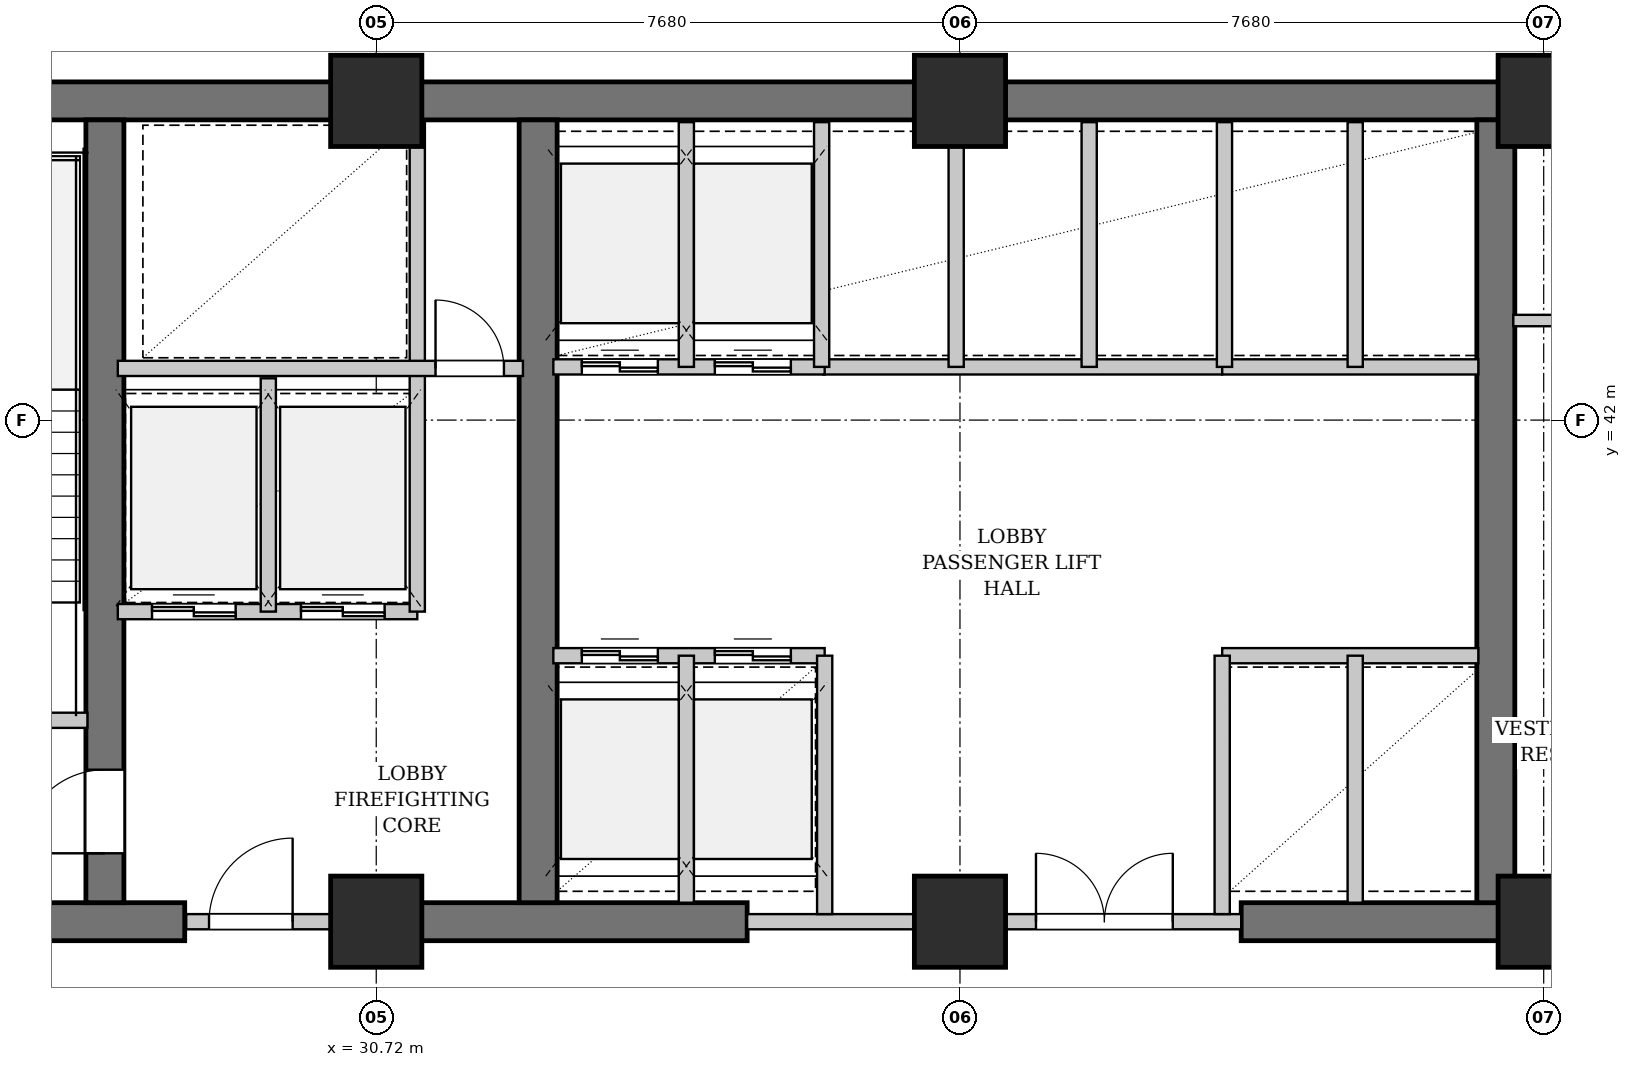
"""IFC4 building model, lengths in metres.
Left out: names, types, materials, properties, quantities, classifications, styles, units other than length and angle.
Written with IfcOpenShell. Run it as: python <this file> out.ifc"""

import sys

from ifc_helpers import new_model, si_unit, direction, frame, frame_2d, origin, origin_2d, place, context, subcontext, project, spatial, rectangle, extrude, element, fill, save


model = new_model("IFC4")
c1 = context("Model", 3, precision=1e-05, world=origin(), true_north=direction((0.0, 1.0)))
c2 = subcontext(c1, "Body", "Model", "MODEL_VIEW")
j1 = project(units=[si_unit("LENGTHUNIT", "METRE"), si_unit("PLANEANGLEUNIT", "RADIAN")], contexts=[c1])
p1 = place(None, origin())
s1 = spatial("IfcSite", under=j1, at=p1, CompositionType="ELEMENT")
p2 = place(p1, origin())
s2 = spatial("IfcBuilding", under=s1, at=p2, CompositionType="ELEMENT")
p3 = place(p2, frame((0.0, 0.0, 81.9)))
s3 = spatial("IfcBuildingStorey", under=s2, at=p3, CompositionType="ELEMENT", Elevation=81.9)
p4 = place(p3, frame((22.79, 46.2, 0.0), z_axis=(0.0, 0.0, 1.0), x_axis=(1.0, 0.0, 0.0)))
e1 = element("IfcWall", 1, at=p4, inside=s3, PredefinedType="SHEAR", context=c2, shape_type="SweptSolid", body=[
    extrude(rectangle(XDim=31.22, YDim=0.5, at=frame_2d((15.61, 0.0))), origin(), (0.0, 0.0, 1.0), 3.48),
])
p5 = place(p3, frame((22.79, 35.4, 0.0), z_axis=(0.0, 0.0, 1.0), x_axis=(1.0, 0.0, 0.0)))
e2 = element("IfcWall", 2, at=p5, inside=s3, PredefinedType="SHEAR", context=c2, shape_type="SweptSolid", body=[
    extrude(rectangle(XDim=5.41, YDim=0.5, at=frame_2d((2.705, 0.0))), origin(), (0.0, 0.0, 1.0), 3.48),
])
p6 = place(p3, frame((30.72, 35.4, 0.0), z_axis=(0.0, 0.0, 1.0), x_axis=(1.0, 0.0, 0.0)))
e3 = element("IfcWall", 3, at=p6, inside=s3, PredefinedType="SHEAR", context=c2, shape_type="SweptSolid", body=[
    extrude(rectangle(XDim=4.88, YDim=0.5, at=frame_2d((2.44, 0.0))), origin(), (0.0, 0.0, 1.0), 3.48),
])
p7 = place(p3, frame((42.1, 35.4, 0.0), z_axis=(0.0, 0.0, 1.0), x_axis=(1.0, 0.0, 0.0)))
e4 = element("IfcWall", 4, at=p7, inside=s3, PredefinedType="SHEAR", context=c2, shape_type="SweptSolid", body=[
    extrude(rectangle(XDim=8.05, YDim=0.5, at=frame_2d((4.025, 0.0))), origin(), (0.0, 0.0, 1.0), 3.48),
])
p8 = place(p7, frame((4.85, 0.0, 0.0)))
e5 = element("IfcOpeningElement", 5, at=p8, cuts=e4, PredefinedType="OPENING", context=c2, shape_type="SweptSolid", body=[
    extrude(rectangle(XDim=0.9, YDim=2.15, at=frame_2d((0.45, 1.075))), frame((0.0, 0.26, 0.0), z_axis=(0.0, -1.0, 0.0), x_axis=(1.0, 0.0, 0.0)), (0.0, 0.0, 1.0), 0.52),
])
p9 = place(p3, frame((27.15, 35.65, 0.0), z_axis=(0.0, 0.0, 1.0), x_axis=(0.0, 1.0, 0.0)))
e6 = element("IfcWall", 6, at=p9, inside=s3, PredefinedType="SHEAR", context=c2, shape_type="SweptSolid", body=[
    extrude(rectangle(XDim=10.3, YDim=0.5, at=frame_2d((5.15, 0.0))), origin(), (0.0, 0.0, 1.0), 3.48),
])
p10 = place(p9, frame((0.65, 0.0, 0.0)))
e7 = element("IfcOpeningElement", 7, at=p10, cuts=e6, PredefinedType="OPENING", context=c2, shape_type="SweptSolid", body=[
    extrude(rectangle(XDim=1.1, YDim=2.15, at=frame_2d((0.55, 1.075))), frame((0.0, 0.26, 0.0), z_axis=(0.0, -1.0, 0.0), x_axis=(1.0, 0.0, 0.0)), (0.0, 0.0, 1.0), 0.52),
])
for number, where, z_axis, x_axis in (
    (8, (32.85, 35.65, 0.0), (0.0, 0.0, 1.0), (0.0, 1.0, 0.0)),
    (9, (45.45, 35.65, 0.0), (0.0, 0.0, 1.0), (0.0, 1.0, 0.0)),
):
    element("IfcWall", number, at=place(p3, frame(where, z_axis=z_axis, x_axis=x_axis)), inside=s3, PredefinedType="SHEAR", context=c2, shape_type="SweptSolid", body=[
        extrude(rectangle(XDim=10.3, YDim=0.5, at=frame_2d((5.15, 0.0))), origin(), (0.0, 0.0, 1.0), 3.48),
    ])
for number, where, z_axis, x_axis in (
    (10, (30.72, 35.4, 0.0), (0.0, 0.0, 1.0), (1.0, 0.0, 0.0)),
    (11, (30.72, 46.2, 0.0), (0.0, 0.0, 1.0), (1.0, 0.0, 0.0)),
    (12, (38.4, 35.4, 0.0), (0.0, 0.0, 1.0), (1.0, 0.0, 0.0)),
    (13, (38.4, 46.2, 0.0), (0.0, 0.0, 1.0), (1.0, 0.0, 0.0)),
    (14, (46.08, 35.4, 0.0), (0.0, 0.0, 1.0), (1.0, 0.0, 0.0)),
    (15, (46.08, 46.2, 0.0), (0.0, 0.0, 1.0), (1.0, 0.0, 0.0)),
):
    element("IfcColumn", number, at=place(p3, frame(where, z_axis=z_axis, x_axis=x_axis)), inside=s3, PredefinedType="COLUMN", context=c2, shape_type="SweptSolid", body=[
        extrude(rectangle(XDim=1.2, YDim=1.2, at=origin_2d()), origin(), (0.0, 0.0, 1.0), 3.9),
    ])
p11 = place(p3, frame((23.3, 38.05, 0.0), z_axis=(0.0, 0.0, 1.0), x_axis=(1.0, 0.0, 0.0)))
e16 = element("IfcWall", 16, at=p11, inside=s3, PredefinedType="PARTITIONING", context=c2, shape_type="SweptSolid", body=[
    extrude(rectangle(XDim=3.62, YDim=0.2, at=frame_2d((1.81, 0.0))), origin(), (0.0, 0.0, 1.0), 3.48),
])
p12 = place(p11, frame((1.26, 0.0, 0.0)))
e17 = element("IfcOpeningElement", 17, at=p12, cuts=e16, PredefinedType="OPENING", context=c2, shape_type="SweptSolid", body=[
    extrude(rectangle(XDim=1.1, YDim=2.15, at=frame_2d((0.55, 1.075))), frame((0.0, 0.11, 0.0), z_axis=(0.0, -1.0, 0.0), x_axis=(1.0, 0.0, 0.0)), (0.0, 0.0, 1.0), 0.22),
])
p13 = place(p3, frame((28.22, 35.4, 0.0), z_axis=(0.0, 0.0, 1.0), x_axis=(1.0, 0.0, 0.0)))
e18 = element("IfcWall", 18, at=p13, inside=s3, PredefinedType="PARTITIONING", context=c2, shape_type="SweptSolid", body=[
    extrude(rectangle(XDim=2.5, YDim=0.2, at=frame_2d((1.25, 0.0))), origin(), (0.0, 0.0, 1.0), 2.565),
])
p14 = place(p13, frame((0.3, 0.0, 0.0)))
e19 = element("IfcOpeningElement", 19, at=p14, cuts=e18, PredefinedType="OPENING", context=c2, shape_type="SweptSolid", body=[
    extrude(rectangle(XDim=1.1, YDim=2.15, at=frame_2d((0.55, 1.075))), frame((0.0, 0.11, 0.0), z_axis=(0.0, -1.0, 0.0), x_axis=(1.0, 0.0, 0.0)), (0.0, 0.0, 1.0), 0.22),
])
p15 = place(p3, frame((27.32, 39.48, 0.0), z_axis=(0.0, 0.0, 1.0), x_axis=(1.0, 0.0, 0.0)))
e20 = element("IfcWall", 20, at=p15, inside=s3, PredefinedType="PARTITIONING", context=c2, shape_type="SweptSolid", body=[
    extrude(rectangle(XDim=3.94, YDim=0.2, at=frame_2d((1.97, 0.0))), origin(), (0.0, 0.0, 1.0), 3.48),
])
p16 = place(p15, frame((0.45, 0.0, 0.0)))
e21 = element("IfcOpeningElement", 21, at=p16, cuts=e20, PredefinedType="OPENING", context=c2, shape_type="SweptSolid", body=[
    extrude(rectangle(XDim=1.1, YDim=2.2, at=frame_2d((0.55, 1.1))), frame((0.0, 0.11, 0.0), z_axis=(0.0, -1.0, 0.0), x_axis=(1.0, 0.0, 0.0)), (0.0, 0.0, 1.0), 0.22),
])
p17 = place(p15, frame((2.41, 0.0, 0.0)))
e22 = element("IfcOpeningElement", 22, at=p17, cuts=e20, PredefinedType="OPENING", context=c2, shape_type="SweptSolid", body=[
    extrude(rectangle(XDim=1.1, YDim=2.2, at=frame_2d((0.55, 1.1))), frame((0.0, 0.11, 0.0), z_axis=(0.0, -1.0, 0.0), x_axis=(1.0, 0.0, 0.0)), (0.0, 0.0, 1.0), 0.22),
])
p18 = place(p3, frame((29.3, 39.48, 0.0), z_axis=(0.0, 0.0, 1.0), x_axis=(0.0, 1.0, 0.0)))
e23 = element("IfcWall", 23, at=p18, inside=s3, PredefinedType="PARTITIONING", context=c2, shape_type="SweptSolid", body=[
    extrude(rectangle(XDim=3.07, YDim=0.2, at=frame_2d((1.535, 0.0))), origin(), (0.0, 0.0, 1.0), 3.48),
])
p19 = place(p3, frame((31.26, 39.48, 0.0), z_axis=(0.0, 0.0, 1.0), x_axis=(0.0, 1.0, 0.0)))
e24 = element("IfcWall", 24, at=p19, inside=s3, PredefinedType="PARTITIONING", context=c2, shape_type="SweptSolid", body=[
    extrude(rectangle(XDim=6.44, YDim=0.2, at=frame_2d((3.22, 0.0))), origin(), (0.0, 0.0, 1.0), 3.48),
])
p20 = place(p3, frame((27.32, 42.68, 0.0), z_axis=(0.0, 0.0, 1.0), x_axis=(1.0, 0.0, 0.0)))
e25 = element("IfcWall", 25, at=p20, inside=s3, PredefinedType="PARTITIONING", context=c2, shape_type="SweptSolid", body=[
    extrude(rectangle(XDim=5.33, YDim=0.2, at=frame_2d((2.665, 0.0))), origin(), (0.0, 0.0, 1.0), 3.48),
])
p21 = place(p20, frame((4.18, 0.0, 0.0)))
e26 = element("IfcOpeningElement", 26, at=p21, cuts=e25, PredefinedType="OPENING", context=c2, shape_type="SweptSolid", body=[
    extrude(rectangle(XDim=0.9, YDim=2.15, at=frame_2d((0.45, 1.075))), frame((0.0, 0.11, 0.0), z_axis=(0.0, -1.0, 0.0), x_axis=(1.0, 0.0, 0.0)), (0.0, 0.0, 1.0), 0.22),
])
p22 = place(p3, frame((35.6, 35.4, 0.0), z_axis=(0.0, 0.0, 1.0), x_axis=(1.0, 0.0, 0.0)))
e27 = element("IfcWall", 27, at=p22, inside=s3, PredefinedType="PARTITIONING", context=c2, shape_type="SweptSolid", body=[
    extrude(rectangle(XDim=6.5, YDim=0.2, at=frame_2d((3.25, 0.0))), origin(), (0.0, 0.0, 1.0), 2.565),
])
p23 = place(p22, frame((3.8, 0.0, 0.0)))
e28 = element("IfcOpeningElement", 28, at=p23, cuts=e27, PredefinedType="OPENING", context=c2, shape_type="SweptSolid", body=[
    extrude(rectangle(XDim=1.8, YDim=2.3, at=frame_2d((0.9, 1.15))), frame((0.0, 0.11, 0.0), z_axis=(0.0, -1.0, 0.0), x_axis=(1.0, 0.0, 0.0)), (0.0, 0.0, 1.0), 0.22),
])
p24 = place(p3, frame((36.6, 42.7, 0.0), z_axis=(0.0, 0.0, 1.0), x_axis=(1.0, 0.0, 0.0)))
e29 = element("IfcWall", 29, at=p24, inside=s3, PredefinedType="PARTITIONING", context=c2, shape_type="SweptSolid", body=[
    extrude(rectangle(XDim=5.25, YDim=0.2, at=frame_2d((2.625, 0.0))), origin(), (0.0, 0.0, 1.0), 3.48),
])
p25 = place(p3, frame((38.35, 42.7, 0.0), z_axis=(0.0, 0.0, 1.0), x_axis=(0.0, 1.0, 0.0)))
e30 = element("IfcWall", 30, at=p25, inside=s3, PredefinedType="PARTITIONING", context=c2, shape_type="SweptSolid", body=[
    extrude(rectangle(XDim=3.22, YDim=0.2, at=frame_2d((1.61, 0.0))), origin(), (0.0, 0.0, 1.0), 2.565),
])
p26 = place(p3, frame((40.1, 42.7, 0.0), z_axis=(0.0, 0.0, 1.0), x_axis=(0.0, 1.0, 0.0)))
e31 = element("IfcWall", 31, at=p26, inside=s3, PredefinedType="PARTITIONING", context=c2, shape_type="SweptSolid", body=[
    extrude(rectangle(XDim=3.22, YDim=0.2, at=frame_2d((1.61, 0.0))), origin(), (0.0, 0.0, 1.0), 3.48),
])
p27 = place(p3, frame((33.05, 38.9, 0.0), z_axis=(0.0, 0.0, 1.0), x_axis=(1.0, 0.0, 0.0)))
e32 = element("IfcWall", 32, at=p27, inside=s3, PredefinedType="PARTITIONING", context=c2, shape_type="SweptSolid", body=[
    extrude(rectangle(XDim=3.57, YDim=0.2, at=frame_2d((1.785, 0.0))), origin(), (0.0, 0.0, 1.0), 3.48),
])
p28 = place(p27, frame((0.375, 0.0, 0.0)))
e33 = element("IfcOpeningElement", 33, at=p28, cuts=e32, PredefinedType="OPENING", context=c2, shape_type="SweptSolid", body=[
    extrude(rectangle(XDim=1.0, YDim=2.2, at=frame_2d((0.5, 1.1))), frame((0.0, 0.11, 0.0), z_axis=(0.0, -1.0, 0.0), x_axis=(1.0, 0.0, 0.0)), (0.0, 0.0, 1.0), 0.22),
])
p29 = place(p27, frame((2.125, 0.0, 0.0)))
e34 = element("IfcOpeningElement", 34, at=p29, cuts=e32, PredefinedType="OPENING", context=c2, shape_type="SweptSolid", body=[
    extrude(rectangle(XDim=1.0, YDim=2.2, at=frame_2d((0.5, 1.1))), frame((0.0, 0.11, 0.0), z_axis=(0.0, -1.0, 0.0), x_axis=(1.0, 0.0, 0.0)), (0.0, 0.0, 1.0), 0.22),
])
p30 = place(p3, frame((33.05, 42.7, 0.0), z_axis=(0.0, 0.0, 1.0), x_axis=(1.0, 0.0, 0.0)))
e35 = element("IfcWall", 35, at=p30, inside=s3, PredefinedType="PARTITIONING", context=c2, shape_type="SweptSolid", body=[
    extrude(rectangle(XDim=3.57, YDim=0.2, at=frame_2d((1.785, 0.0))), origin(), (0.0, 0.0, 1.0), 3.48),
])
p31 = place(p30, frame((0.375, 0.0, 0.0)))
e36 = element("IfcOpeningElement", 36, at=p31, cuts=e35, PredefinedType="OPENING", context=c2, shape_type="SweptSolid", body=[
    extrude(rectangle(XDim=1.0, YDim=2.2, at=frame_2d((0.5, 1.1))), frame((0.0, 0.11, 0.0), z_axis=(0.0, -1.0, 0.0), x_axis=(1.0, 0.0, 0.0)), (0.0, 0.0, 1.0), 0.22),
])
p32 = place(p30, frame((2.125, 0.0, 0.0)))
e37 = element("IfcOpeningElement", 37, at=p32, cuts=e35, PredefinedType="OPENING", context=c2, shape_type="SweptSolid", body=[
    extrude(rectangle(XDim=1.0, YDim=2.2, at=frame_2d((0.5, 1.1))), frame((0.0, 0.11, 0.0), z_axis=(0.0, -1.0, 0.0), x_axis=(1.0, 0.0, 0.0)), (0.0, 0.0, 1.0), 0.22),
])
p33 = place(p3, frame((34.8, 35.65, 0.0), z_axis=(0.0, 0.0, 1.0), x_axis=(0.0, 1.0, 0.0)))
e38 = element("IfcWall", 38, at=p33, inside=s3, PredefinedType="PARTITIONING", context=c2, shape_type="SweptSolid", body=[
    extrude(rectangle(XDim=3.25, YDim=0.2, at=frame_2d((1.625, 0.0))), origin(), (0.0, 0.0, 1.0), 3.48),
])
p34 = place(p3, frame((34.8, 42.7, 0.0), z_axis=(0.0, 0.0, 1.0), x_axis=(0.0, 1.0, 0.0)))
e39 = element("IfcWall", 39, at=p34, inside=s3, PredefinedType="PARTITIONING", context=c2, shape_type="SweptSolid", body=[
    extrude(rectangle(XDim=3.22, YDim=0.2, at=frame_2d((1.61, 0.0))), origin(), (0.0, 0.0, 1.0), 3.48),
])
p35 = place(p3, frame((36.62, 35.5, 0.0), z_axis=(0.0, 0.0, 1.0), x_axis=(0.0, 1.0, 0.0)))
e40 = element("IfcWall", 40, at=p35, inside=s3, PredefinedType="PARTITIONING", context=c2, shape_type="SweptSolid", body=[
    extrude(rectangle(XDim=3.4, YDim=0.2, at=frame_2d((1.7, 0.0))), origin(), (0.0, 0.0, 1.0), 3.48),
])
p36 = place(p3, frame((36.58, 42.7, 0.0), z_axis=(0.0, 0.0, 1.0), x_axis=(0.0, 1.0, 0.0)))
e41 = element("IfcWall", 41, at=p36, inside=s3, PredefinedType="PARTITIONING", context=c2, shape_type="SweptSolid", body=[
    extrude(rectangle(XDim=3.22, YDim=0.2, at=frame_2d((1.61, 0.0))), origin(), (0.0, 0.0, 1.0), 3.48),
])
for number, where, z_axis, x_axis in (
    (42, (41.85, 38.9, 0.0), (0.0, 0.0, 1.0), (1.0, 0.0, 0.0)),
    (43, (41.85, 42.7, 0.0), (0.0, 0.0, 1.0), (1.0, 0.0, 0.0)),
):
    element("IfcWall", number, at=place(p3, frame(where, z_axis=z_axis, x_axis=x_axis)), inside=s3, PredefinedType="PARTITIONING", context=c2, shape_type="SweptSolid", body=[
        extrude(rectangle(XDim=3.37, YDim=0.2, at=frame_2d((1.685, 0.0))), origin(), (0.0, 0.0, 1.0), 3.48),
    ])
p37 = place(p3, frame((43.6, 35.65, 0.0), z_axis=(0.0, 0.0, 1.0), x_axis=(0.0, 1.0, 0.0)))
e44 = element("IfcWall", 44, at=p37, inside=s3, PredefinedType="PARTITIONING", context=c2, shape_type="SweptSolid", body=[
    extrude(rectangle(XDim=3.25, YDim=0.2, at=frame_2d((1.625, 0.0))), origin(), (0.0, 0.0, 1.0), 3.48),
])
p38 = place(p3, frame((43.6, 42.7, 0.0), z_axis=(0.0, 0.0, 1.0), x_axis=(0.0, 1.0, 0.0)))
e45 = element("IfcWall", 45, at=p38, inside=s3, PredefinedType="PARTITIONING", context=c2, shape_type="SweptSolid", body=[
    extrude(rectangle(XDim=3.22, YDim=0.2, at=frame_2d((1.61, 0.0))), origin(), (0.0, 0.0, 1.0), 3.48),
])
p39 = place(p3, frame((41.85, 35.5, 0.0), z_axis=(0.0, 0.0, 1.0), x_axis=(0.0, 1.0, 0.0)))
e46 = element("IfcWall", 46, at=p39, inside=s3, PredefinedType="PARTITIONING", context=c2, shape_type="SweptSolid", body=[
    extrude(rectangle(XDim=3.4, YDim=0.2, at=frame_2d((1.7, 0.0))), origin(), (0.0, 0.0, 1.0), 3.48),
])
p40 = place(p3, frame((41.88, 42.7, 0.0), z_axis=(0.0, 0.0, 1.0), x_axis=(0.0, 1.0, 0.0)))
e47 = element("IfcWall", 47, at=p40, inside=s3, PredefinedType="PARTITIONING", context=c2, shape_type="SweptSolid", body=[
    extrude(rectangle(XDim=3.22, YDim=0.2, at=frame_2d((1.61, 0.0))), origin(), (0.0, 0.0, 1.0), 3.48),
])
p41 = place(p3, frame((45.68, 43.31, 0.0), z_axis=(0.0, 0.0, 1.0), x_axis=(1.0, 0.0, 0.0)))
e48 = element("IfcWall", 48, at=p41, inside=s3, PredefinedType="PARTITIONING", context=c2, shape_type="SweptSolid", body=[
    extrude(rectangle(XDim=2.2, YDim=0.15, at=frame_2d((1.1, 0.0))), origin(), (0.0, 0.0, 1.0), 3.48),
])
p42 = place(p41, frame((0.65, 0.0, 0.0)))
e49 = element("IfcOpeningElement", 49, at=p42, cuts=e48, PredefinedType="OPENING", context=c2, shape_type="SweptSolid", body=[
    extrude(rectangle(XDim=0.9, YDim=2.15, at=frame_2d((0.45, 1.075))), frame((0.0, 0.085, 0.0), z_axis=(0.0, -1.0, 0.0), x_axis=(1.0, 0.0, 0.0)), (0.0, 0.0, 1.0), 0.17),
])
p43 = place(p14, origin())
e50 = element("IfcDoor", 50, at=p43, inside=s3, OperationType="SINGLE_SWING_RIGHT", PredefinedType="DOOR", context=c2, shape_type="SweptSolid", body=[
    extrude(rectangle(XDim=1.1, YDim=2.15, at=frame_2d((0.55, 1.075))), frame((0.0, 0.025, 0.0), z_axis=(0.0, -1.0, 0.0), x_axis=(1.0, 0.0, 0.0)), (0.0, 0.0, 1.0), 0.05),
])
fill(e19, e50)
p44 = place(p16, origin())
e51 = element("IfcDoor", 51, at=p44, inside=s3, OperationType="DOUBLE_DOOR_SLIDING", PredefinedType="DOOR", context=c2, shape_type="SweptSolid", body=[
    extrude(rectangle(XDim=1.1, YDim=2.2, at=frame_2d((0.55, 1.1))), frame((0.0, 0.025, 0.0), z_axis=(0.0, -1.0, 0.0), x_axis=(1.0, 0.0, 0.0)), (0.0, 0.0, 1.0), 0.05),
])
fill(e21, e51)
p45 = place(p17, origin())
e52 = element("IfcDoor", 52, at=p45, inside=s3, OperationType="DOUBLE_DOOR_SLIDING", PredefinedType="DOOR", context=c2, shape_type="SweptSolid", body=[
    extrude(rectangle(XDim=1.1, YDim=2.2, at=frame_2d((0.55, 1.1))), frame((0.0, 0.025, 0.0), z_axis=(0.0, -1.0, 0.0), x_axis=(1.0, 0.0, 0.0)), (0.0, 0.0, 1.0), 0.05),
])
fill(e22, e52)
p46 = place(p21, origin())
e53 = element("IfcDoor", 53, at=p46, inside=s3, OperationType="SINGLE_SWING_LEFT", PredefinedType="DOOR", context=c2, shape_type="SweptSolid", body=[
    extrude(rectangle(XDim=0.9, YDim=2.15, at=frame_2d((0.45, 1.075))), frame((0.0, 0.025, 0.0), z_axis=(0.0, -1.0, 0.0), x_axis=(1.0, 0.0, 0.0)), (0.0, 0.0, 1.0), 0.05),
])
fill(e26, e53)
p47 = place(p23, origin())
e54 = element("IfcDoor", 54, at=p47, inside=s3, OperationType="DOUBLE_DOOR_SINGLE_SWING", PredefinedType="DOOR", context=c2, shape_type="SweptSolid", body=[
    extrude(rectangle(XDim=1.8, YDim=2.3, at=frame_2d((0.9, 1.15))), frame((0.0, 0.025, 0.0), z_axis=(0.0, -1.0, 0.0), x_axis=(1.0, 0.0, 0.0)), (0.0, 0.0, 1.0), 0.05),
])
fill(e28, e54)
p48 = place(p28, origin())
e55 = element("IfcDoor", 55, at=p48, inside=s3, OperationType="DOUBLE_DOOR_SLIDING", PredefinedType="DOOR", context=c2, shape_type="SweptSolid", body=[
    extrude(rectangle(XDim=1.0, YDim=2.2, at=frame_2d((0.5, 1.1))), frame((0.0, 0.025, 0.0), z_axis=(0.0, -1.0, 0.0), x_axis=(1.0, 0.0, 0.0)), (0.0, 0.0, 1.0), 0.05),
])
fill(e33, e55)
p49 = place(p29, origin())
e56 = element("IfcDoor", 56, at=p49, inside=s3, OperationType="DOUBLE_DOOR_SLIDING", PredefinedType="DOOR", context=c2, shape_type="SweptSolid", body=[
    extrude(rectangle(XDim=1.0, YDim=2.2, at=frame_2d((0.5, 1.1))), frame((0.0, 0.025, 0.0), z_axis=(0.0, -1.0, 0.0), x_axis=(1.0, 0.0, 0.0)), (0.0, 0.0, 1.0), 0.05),
])
fill(e34, e56)
p50 = place(p31, origin())
e57 = element("IfcDoor", 57, at=p50, inside=s3, OperationType="DOUBLE_DOOR_SLIDING", PredefinedType="DOOR", context=c2, shape_type="SweptSolid", body=[
    extrude(rectangle(XDim=1.0, YDim=2.2, at=frame_2d((0.5, 1.1))), frame((0.0, 0.025, 0.0), z_axis=(0.0, -1.0, 0.0), x_axis=(1.0, 0.0, 0.0)), (0.0, 0.0, 1.0), 0.05),
])
fill(e36, e57)
p51 = place(p32, origin())
e58 = element("IfcDoor", 58, at=p51, inside=s3, OperationType="DOUBLE_DOOR_SLIDING", PredefinedType="DOOR", context=c2, shape_type="SweptSolid", body=[
    extrude(rectangle(XDim=1.0, YDim=2.2, at=frame_2d((0.5, 1.1))), frame((0.0, 0.025, 0.0), z_axis=(0.0, -1.0, 0.0), x_axis=(1.0, 0.0, 0.0)), (0.0, 0.0, 1.0), 0.05),
])
fill(e37, e58)
p52 = place(p10, origin())
e59 = element("IfcDoor", 59, at=p52, inside=s3, OperationType="SINGLE_SWING_LEFT", PredefinedType="DOOR", context=c2, shape_type="SweptSolid", body=[
    extrude(rectangle(XDim=1.1, YDim=2.15, at=frame_2d((0.55, 1.075))), frame((0.0, 0.025, 0.0), z_axis=(0.0, -1.0, 0.0), x_axis=(1.0, 0.0, 0.0)), (0.0, 0.0, 1.0), 0.05),
])
fill(e7, e59)
save(model, sys.argv[1])
